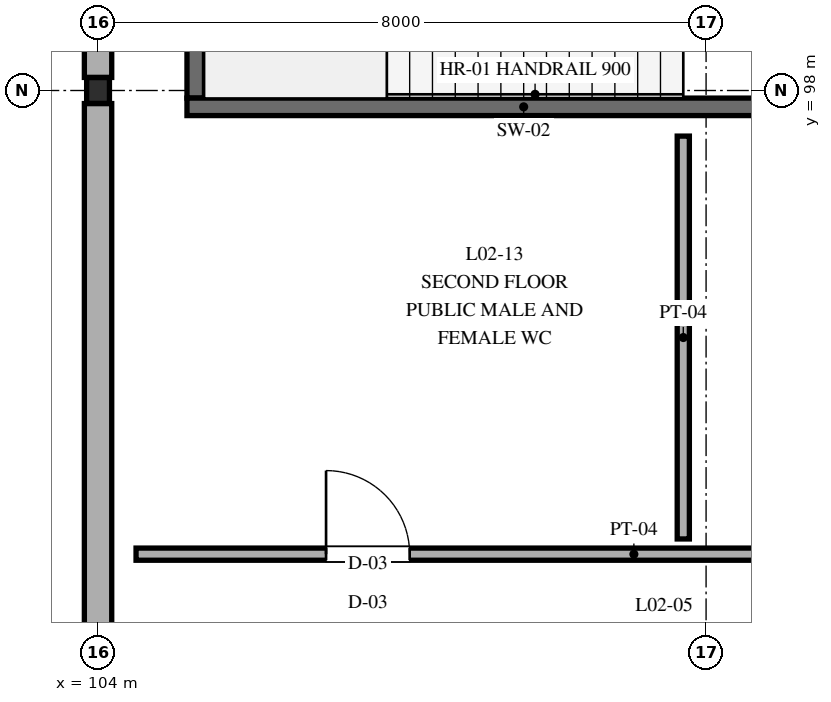
"""IFC4 building model, lengths in metres.
Left out: names, types, materials, properties, quantities, classifications, styles, units other than length and angle.
Written with IfcOpenShell. Run it as: python <this file> out.ifc"""

import sys

from ifc_helpers import new_model, si_unit, direction, frame, frame_2d, origin, origin_2d, place, context, subcontext, project, spatial, rectangle, i_section, extrude, element, fill, save


model = new_model("IFC4")
c1 = context("Model", 3, precision=1e-05, world=origin(), true_north=direction((0.0, 1.0)))
c2 = subcontext(c1, "Body", "Model", "MODEL_VIEW")
j1 = project(units=[si_unit("LENGTHUNIT", "METRE"), si_unit("PLANEANGLEUNIT", "RADIAN")], contexts=[c1])
p1 = place(None, origin())
s1 = spatial("IfcSite", under=j1, at=p1, CompositionType="ELEMENT")
p2 = place(p1, origin())
s2 = spatial("IfcBuilding", under=s1, at=p2, CompositionType="ELEMENT")
p3 = place(p2, frame((0.0, 0.0, 9.6)))
s3 = spatial("IfcBuildingStorey", under=s2, at=p3, CompositionType="ELEMENT", Elevation=9.6)
p4 = place(p3, frame((104.0, 98.0, 0.0), z_axis=(0.0, 0.0, 1.0), x_axis=(1.0, 0.0, 0.0)))
e1 = element("IfcColumn", 1, at=p4, inside=s3, PredefinedType="COLUMN", context=c2, shape_type="SweptSolid", body=[
    extrude(i_section(OverallWidth=0.3, OverallDepth=0.34, WebThickness=0.012, FlangeThickness=0.021, FilletRadius=0.027, at=origin_2d()), origin(), (0.0, 0.0, 1.0), 4.4),
])
for number, where, z_axis, x_axis in (
    (2, (104.0, 97.828, 0.0), (0.0, 0.0, 1.0), (0.0, -1.0, 0.0)),
    (3, (104.0, 105.828, 0.0), (0.0, 0.0, 1.0), (0.0, -1.0, 0.0)),
):
    element("IfcWall", number, at=place(p3, frame(where, z_axis=z_axis, x_axis=x_axis)), inside=s3, PredefinedType="STANDARD", context=c2, shape_type="SweptSolid", body=[
        extrude(rectangle(XDim=7.656, YDim=0.36, at=frame_2d((3.828, 0.0))), origin(), (0.0, 0.0, 1.0), 3.825),
    ])
p5 = place(p3, frame((105.285, 102.2, 0.0), z_axis=(0.0, 0.0, 1.0), x_axis=(0.0, -1.0, 0.0)))
e4 = element("IfcWall", 4, at=p5, inside=s3, PredefinedType="SHEAR", context=c2, shape_type="SweptSolid", body=[
    extrude(rectangle(XDim=4.3, YDim=0.23, at=frame_2d((2.15, 0.0))), origin(), (0.0, 0.0, 1.0), 4.4),
])
p6 = place(p3, frame((105.17, 97.785, 0.0), z_axis=(0.0, 0.0, 1.0), x_axis=(1.0, 0.0, 0.0)))
e5 = element("IfcWall", 5, at=p6, inside=s3, PredefinedType="SHEAR", context=c2, shape_type="SweptSolid", body=[
    extrude(rectangle(XDim=8.86, YDim=0.23, at=frame_2d((4.43, 0.0))), origin(), (0.0, 0.0, 1.0), 4.4),
])
p7 = place(p3, frame((104.5, 91.9, 0.0), z_axis=(0.0, 0.0, 1.0), x_axis=(1.0, 0.0, 0.0)))
e6 = element("IfcWall", 6, at=p7, inside=s3, PredefinedType="PARTITIONING", context=c2, shape_type="SweptSolid", body=[
    extrude(rectangle(XDim=47.0, YDim=0.16, at=frame_2d((23.5, 0.0))), origin(), (0.0, 0.0, 1.0), 3.7),
])
p8 = place(p7, frame((2.5, 0.0, 0.0)))
e7 = element("IfcOpeningElement", 7, at=p8, cuts=e6, PredefinedType="OPENING", context=c2, shape_type="SweptSolid", body=[
    extrude(rectangle(XDim=1.1, YDim=2.2, at=frame_2d((0.55, 1.1))), frame((0.0, 0.09, 0.0), z_axis=(0.0, -1.0, 0.0), x_axis=(1.0, 0.0, 0.0)), (0.0, 0.0, 1.0), 0.18),
])
p9 = place(p7, frame((9.5, 0.0, 0.0)))
e8 = element("IfcOpeningElement", 8, at=p9, cuts=e6, PredefinedType="OPENING", context=c2, shape_type="SweptSolid", body=[
    extrude(rectangle(XDim=1.05, YDim=2.15, at=frame_2d((0.525, 1.075))), frame((0.0, 0.09, 0.0), z_axis=(0.0, -1.0, 0.0), x_axis=(1.0, 0.0, 0.0)), (0.0, 0.0, 1.0), 0.18),
])
p10 = place(p7, frame((12.8, 0.0, 0.0)))
e9 = element("IfcOpeningElement", 9, at=p10, cuts=e6, PredefinedType="OPENING", context=c2, shape_type="SweptSolid", body=[
    extrude(rectangle(XDim=1.6, YDim=2.2, at=frame_2d((0.8, 1.1))), frame((0.0, 0.09, 0.0), z_axis=(0.0, -1.0, 0.0), x_axis=(1.0, 0.0, 0.0)), (0.0, 0.0, 1.0), 0.18),
])
p11 = place(p7, frame((24.0, 0.0, 0.0)))
e10 = element("IfcOpeningElement", 10, at=p11, cuts=e6, PredefinedType="OPENING", context=c2, shape_type="SweptSolid", body=[
    extrude(rectangle(XDim=1.0, YDim=2.15, at=frame_2d((0.5, 1.075))), frame((0.0, 0.09, 0.0), z_axis=(0.0, -1.0, 0.0), x_axis=(1.0, 0.0, 0.0)), (0.0, 0.0, 1.0), 0.18),
])
p12 = place(p7, frame((36.5, 0.0, 0.0)))
e11 = element("IfcOpeningElement", 11, at=p12, cuts=e6, PredefinedType="OPENING", context=c2, shape_type="SweptSolid", body=[
    extrude(rectangle(XDim=1.0, YDim=2.15, at=frame_2d((0.5, 1.075))), frame((0.0, 0.09, 0.0), z_axis=(0.0, -1.0, 0.0), x_axis=(1.0, 0.0, 0.0)), (0.0, 0.0, 1.0), 0.18),
])
p13 = place(p7, frame((43.0, 0.0, 0.0)))
e12 = element("IfcOpeningElement", 12, at=p13, cuts=e6, PredefinedType="OPENING", context=c2, shape_type="SweptSolid", body=[
    extrude(rectangle(XDim=1.0, YDim=2.15, at=frame_2d((0.5, 1.075))), frame((0.0, 0.09, 0.0), z_axis=(0.0, -1.0, 0.0), x_axis=(1.0, 0.0, 0.0)), (0.0, 0.0, 1.0), 0.18),
])
p14 = place(p7, frame((28.5, 0.0, 1.1)))
e13 = element("IfcOpeningElement", 13, at=p14, cuts=e6, PredefinedType="OPENING", context=c2, shape_type="SweptSolid", body=[
    extrude(rectangle(XDim=1.6, YDim=1.35, at=frame_2d((0.8, 0.675))), frame((0.0, 0.09, 0.0), z_axis=(0.0, -1.0, 0.0), x_axis=(1.0, 0.0, 0.0)), (0.0, 0.0, 1.0), 0.18),
])
p15 = place(p3, frame((111.7, 92.1, 0.0), z_axis=(0.0, 0.0, 1.0), x_axis=(0.0, 1.0, 0.0)))
e14 = element("IfcWall", 14, at=p15, inside=s3, PredefinedType="PARTITIONING", context=c2, shape_type="SweptSolid", body=[
    extrude(rectangle(XDim=5.3, YDim=0.16, at=frame_2d((2.65, 0.0))), origin(), (0.0, 0.0, 1.0), 3.7),
])
p16 = place(p8, origin())
e15 = element("IfcDoor", 15, at=p16, inside=s3, OperationType="SINGLE_SWING_LEFT", PredefinedType="DOOR", context=c2, shape_type="SweptSolid", body=[
    extrude(rectangle(XDim=1.1, YDim=2.2, at=frame_2d((0.55, 1.1))), frame((0.0, 0.025, 0.0), z_axis=(0.0, -1.0, 0.0), x_axis=(1.0, 0.0, 0.0)), (0.0, 0.0, 1.0), 0.05),
])
fill(e7, e15)
save(model, sys.argv[1])
